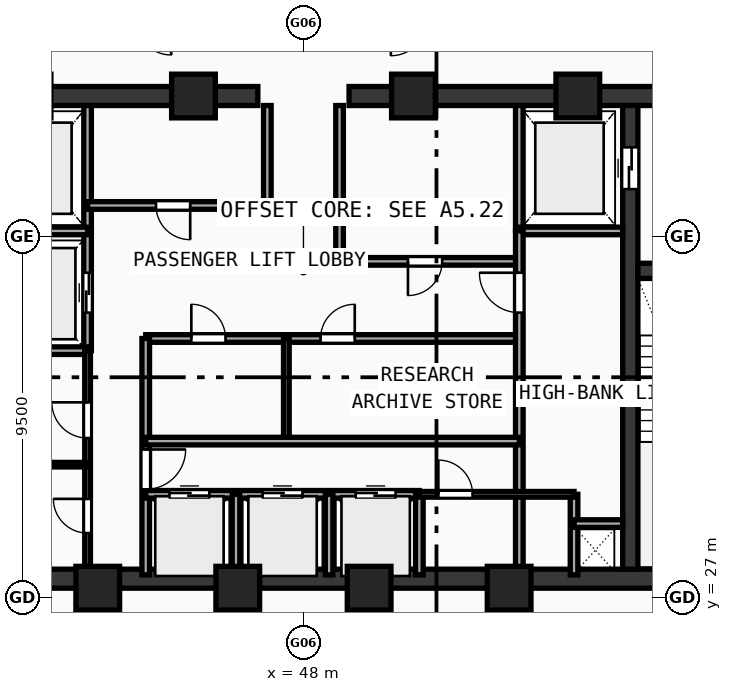
"""IFC4 building model, lengths in metres.
Left out: names, types, materials, properties, quantities, classifications, styles, units other than length and angle.
Written with IfcOpenShell. Run it as: python <this file> out.ifc"""

import sys

from ifc_helpers import new_model, si_unit, direction, frame, frame_2d, origin, origin_with_axes, origin_2d, place, context, subcontext, project, spatial, rectangle, hollow_rectangle, extrude, source, transform, mapped, element, fill, save


model = new_model("IFC4")
c1 = context("Model", 3, precision=1e-05, world=origin(), true_north=direction((0.0, 1.0)))
c2 = subcontext(c1, "Body", "Model", "MODEL_VIEW")
j1 = project(units=[si_unit("LENGTHUNIT", "METRE"), si_unit("PLANEANGLEUNIT", "RADIAN")], contexts=[c1])
p1 = place(None, origin())
s1 = spatial("IfcSite", under=j1, at=p1, CompositionType="ELEMENT")
p2 = place(p1, origin())
s2 = spatial("IfcBuilding", under=s1, at=p2, CompositionType="ELEMENT")
p3 = place(p2, frame((0.0, 0.0, 363.01)))
s3 = spatial("IfcBuildingStorey", under=s2, at=p3, CompositionType="ELEMENT", Elevation=363.01)
p4 = place(p3, frame((35.55, 27.5, 0.0), z_axis=(0.0, 0.0, 1.0), x_axis=(1.0, 0.0, 0.0)))
e1 = element("IfcWall", 1, at=p4, inside=s3, PredefinedType="SHEAR", context=c2, shape_type="SweptSolid", body=[
    extrude(rectangle(XDim=24.9, YDim=0.5, at=frame_2d((12.45, 0.0))), origin(), (0.0, 0.0, 1.0), 3.47),
])
p5 = place(p3, frame((35.55, 40.2, 0.0), z_axis=(0.0, 0.0, 1.0), x_axis=(1.0, 0.0, 0.0)))
e2 = element("IfcWall", 2, at=p5, inside=s3, PredefinedType="SHEAR", context=c2, shape_type="SweptSolid", body=[
    extrude(rectangle(XDim=11.25, YDim=0.5, at=frame_2d((5.625, 0.0))), origin(), (0.0, 0.0, 1.0), 3.47),
])
p6 = place(p5, frame((1.6, 0.0, 0.0)))
e3 = element("IfcOpeningElement", 3, at=p6, cuts=e2, PredefinedType="OPENING", context=c2, shape_type="SweptSolid", body=[
    extrude(rectangle(XDim=1.05, YDim=2.1, at=frame_2d((0.525, 1.05))), frame((0.0, 0.26, 0.0), z_axis=(0.0, -1.0, 0.0), x_axis=(1.0, 0.0, 0.0)), (0.0, 0.0, 1.0), 0.52),
])
p7 = place(p3, frame((49.2, 40.2, 0.0), z_axis=(0.0, 0.0, 1.0), x_axis=(1.0, 0.0, 0.0)))
e4 = element("IfcWall", 4, at=p7, inside=s3, PredefinedType="SHEAR", context=c2, shape_type="SweptSolid", body=[
    extrude(rectangle(XDim=11.25, YDim=0.5, at=frame_2d((5.625, 0.0))), origin(), (0.0, 0.0, 1.0), 3.47),
])
p8 = place(p7, frame((8.6, 0.0, 0.0)))
e5 = element("IfcOpeningElement", 5, at=p8, cuts=e4, PredefinedType="OPENING", context=c2, shape_type="SweptSolid", body=[
    extrude(rectangle(XDim=1.05, YDim=2.1, at=frame_2d((0.525, 1.05))), frame((0.0, 0.26, 0.0), z_axis=(0.0, -1.0, 0.0), x_axis=(1.0, 0.0, 0.0)), (0.0, 0.0, 1.0), 0.52),
])
p9 = place(p3, frame((56.6, 27.75, 0.0), z_axis=(0.0, 0.0, 1.0), x_axis=(0.0, 1.0, 0.0)))
e6 = element("IfcWall", 6, at=p9, inside=s3, PredefinedType="SHEAR", context=c2, shape_type="SweptSolid", body=[
    extrude(rectangle(XDim=12.2, YDim=0.4, at=frame_2d((6.1, 0.0))), origin(), (0.0, 0.0, 1.0), 3.47),
])
p10 = place(p9, frame((10.0, 0.0, 0.0)))
e7 = element("IfcOpeningElement", 7, at=p10, cuts=e6, PredefinedType="OPENING", context=c2, shape_type="SweptSolid", body=[
    extrude(rectangle(XDim=1.1, YDim=2.1, at=frame_2d((0.55, 1.05))), frame((0.0, 0.21, 0.0), z_axis=(0.0, -1.0, 0.0), x_axis=(1.0, 0.0, 0.0)), (0.0, 0.0, 1.0), 0.42),
])
p11 = place(p3, frame((56.8, 35.6, 0.0), z_axis=(0.0, 0.0, 1.0), x_axis=(1.0, 0.0, 0.0)))
e8 = element("IfcWall", 8, at=p11, inside=s3, PredefinedType="SHEAR", context=c2, shape_type="SweptSolid", body=[
    extrude(rectangle(XDim=3.15, YDim=0.4, at=frame_2d((1.575, 0.0))), origin(), (0.0, 0.0, 1.0), 3.47),
])
p12 = place(p11, frame((1.02, 0.0, 0.0)))
e9 = element("IfcOpeningElement", 9, at=p12, cuts=e8, PredefinedType="OPENING", context=c2, shape_type="SweptSolid", body=[
    extrude(rectangle(XDim=1.05, YDim=2.1, at=frame_2d((0.525, 1.05))), frame((0.0, 0.21, 0.0), z_axis=(0.0, -1.0, 0.0), x_axis=(1.0, 0.0, 0.0)), (0.0, 0.0, 1.0), 0.42),
])
m1 = source(origin(), c2, "Body", "SweptSolid", [
    extrude(hollow_rectangle(XDim=1.15, YDim=1.15, WallThickness=0.048, at=origin_2d()), origin(), (0.0, 0.0, 1.0), 3.73),
])
for number, where, z_axis, x_axis in (
    (10, (42.588, 27.25, -0.26), (0.0, 0.0, 1.0), (1.0, 0.0, 0.0)),
    (11, (46.272, 27.25, -0.26), (0.0, 0.0, 1.0), (1.0, 0.0, 0.0)),
    (12, (49.729, 27.25, -0.26), (0.0, 0.0, 1.0), (1.0, 0.0, 0.0)),
    (13, (53.412, 27.25, -0.26), (0.0, 0.0, 1.0), (1.0, 0.0, 0.0)),
    (14, (55.219, 40.2, -0.26), (0.0, 0.0, 1.0), (1.0, 0.0, 0.0)),
    (15, (50.894, 40.2, -0.26), (0.0, 0.0, 1.0), (1.0, 0.0, 0.0)),
    (16, (45.106, 40.2, -0.26), (0.0, 0.0, 1.0), (1.0, 0.0, 0.0)),
):
    element("IfcColumn", number, at=place(p3, frame(where, z_axis=z_axis, x_axis=x_axis)), inside=s3, PredefinedType="COLUMN", context=c2, shape_type="MappedRepresentation", body=[
        mapped(m1, transform((0.0, 0.0, 0.0), scale=1.0)),
    ])
p13 = place(p3, frame((42.32, 33.5, 0.0), z_axis=(0.0, 0.0, 1.0), x_axis=(0.0, 1.0, 0.0)))
e17 = element("IfcWall", 17, at=p13, inside=s3, PredefinedType="SOLIDWALL", context=c2, shape_type="SweptSolid", body=[
    extrude(rectangle(XDim=6.45, YDim=0.2, at=frame_2d((3.225, 0.0))), origin(), (0.0, 0.0, 1.0), 3.47),
])
p14 = place(p13, frame((1.0, 0.0, 0.0)))
e18 = element("IfcOpeningElement", 18, at=p14, cuts=e17, PredefinedType="OPENING", context=c2, shape_type="SweptSolid", body=[
    extrude(rectangle(XDim=1.05, YDim=2.1, at=frame_2d((0.525, 1.05))), frame((0.0, 0.11, 0.0), z_axis=(0.0, -1.0, 0.0), x_axis=(1.0, 0.0, 0.0)), (0.0, 0.0, 1.0), 0.22),
])
for number, where, z_axis, x_axis in (
    (19, (39.6, 36.65, 0.0), (0.0, 0.0, 1.0), (1.0, 0.0, 0.0)),
    (20, (39.6, 33.5, 0.0), (0.0, 0.0, 1.0), (1.0, 0.0, 0.0)),
):
    element("IfcWall", number, at=place(p3, frame(where, z_axis=z_axis, x_axis=x_axis)), inside=s3, PredefinedType="SOLIDWALL", context=c2, shape_type="SweptSolid", body=[
        extrude(rectangle(XDim=2.72, YDim=0.2, at=frame_2d((1.36, 0.0))), origin(), (0.0, 0.0, 1.0), 3.47),
    ])
p15 = place(p3, frame((53.68, 36.65, 0.0), z_axis=(0.0, 0.0, 1.0), x_axis=(0.0, 1.0, 0.0)))
e21 = element("IfcWall", 21, at=p15, inside=s3, PredefinedType="SOLIDWALL", context=c2, shape_type="SweptSolid", body=[
    extrude(rectangle(XDim=3.3, YDim=0.2, at=frame_2d((1.65, 0.0))), origin(), (0.0, 0.0, 1.0), 3.47),
])
p16 = place(p3, frame((53.68, 36.65, 0.0), z_axis=(0.0, 0.0, 1.0), x_axis=(1.0, 0.0, 0.0)))
e22 = element("IfcWall", 22, at=p16, inside=s3, PredefinedType="SOLIDWALL", context=c2, shape_type="SweptSolid", body=[
    extrude(rectangle(XDim=2.72, YDim=0.2, at=frame_2d((1.36, 0.0))), origin(), (0.0, 0.0, 1.0), 3.47),
])
p17 = place(p3, frame((42.32, 37.32, 0.0), z_axis=(0.0, 0.0, 1.0), x_axis=(1.0, 0.0, 0.0)))
e23 = element("IfcWall", 23, at=p17, inside=s3, PredefinedType="SOLIDWALL", context=c2, shape_type="SweptSolid", body=[
    extrude(rectangle(XDim=4.73, YDim=0.2, at=frame_2d((2.365, 0.0))), origin(), (0.0, 0.0, 1.0), 3.47),
])
p18 = place(p17, frame((1.8, 0.0, 0.0)))
e24 = element("IfcOpeningElement", 24, at=p18, cuts=e23, PredefinedType="OPENING", context=c2, shape_type="SweptSolid", body=[
    extrude(rectangle(XDim=0.9, YDim=2.1, at=frame_2d((0.45, 1.05))), frame((0.0, 0.11, 0.0), z_axis=(0.0, -1.0, 0.0), x_axis=(1.0, 0.0, 0.0)), (0.0, 0.0, 1.0), 0.22),
])
p19 = place(p3, frame((48.95, 35.85, 0.0), z_axis=(0.0, 0.0, 1.0), x_axis=(1.0, 0.0, 0.0)))
e25 = element("IfcWall", 25, at=p19, inside=s3, PredefinedType="SOLIDWALL", context=c2, shape_type="SweptSolid", body=[
    extrude(rectangle(XDim=4.73, YDim=0.2, at=frame_2d((2.365, 0.0))), origin(), (0.0, 0.0, 1.0), 3.47),
])
p20 = place(p19, frame((1.8, 0.0, 0.0)))
e26 = element("IfcOpeningElement", 26, at=p20, cuts=e25, PredefinedType="OPENING", context=c2, shape_type="SweptSolid", body=[
    extrude(rectangle(XDim=0.9, YDim=2.1, at=frame_2d((0.45, 1.05))), frame((0.0, 0.11, 0.0), z_axis=(0.0, -1.0, 0.0), x_axis=(1.0, 0.0, 0.0)), (0.0, 0.0, 1.0), 0.22),
])
p21 = place(p3, frame((47.05, 37.32, 0.0), z_axis=(0.0, 0.0, 1.0), x_axis=(0.0, 1.0, 0.0)))
e27 = element("IfcWall", 27, at=p21, inside=s3, PredefinedType="SOLIDWALL", context=c2, shape_type="SweptSolid", body=[
    extrude(rectangle(XDim=2.63, YDim=0.2, at=frame_2d((1.315, 0.0))), origin(), (0.0, 0.0, 1.0), 3.47),
])
p22 = place(p3, frame((48.95, 35.85, 0.0), z_axis=(0.0, 0.0, 1.0), x_axis=(0.0, 1.0, 0.0)))
e28 = element("IfcWall", 28, at=p22, inside=s3, PredefinedType="SOLIDWALL", context=c2, shape_type="SweptSolid", body=[
    extrude(rectangle(XDim=4.1, YDim=0.2, at=frame_2d((2.05, 0.0))), origin(), (0.0, 0.0, 1.0), 3.47),
])
p23 = place(p3, frame((43.85, 33.82, 0.0), z_axis=(0.0, 0.0, 1.0), x_axis=(1.0, 0.0, 0.0)))
e29 = element("IfcWall", 29, at=p23, inside=s3, PredefinedType="SOLIDWALL", context=c2, shape_type="SweptSolid", body=[
    extrude(rectangle(XDim=9.83, YDim=0.2, at=frame_2d((4.915, 0.0))), origin(), (0.0, 0.0, 1.0), 3.47),
])
p24 = place(p23, frame((1.2, 0.0, 0.0)))
e30 = element("IfcOpeningElement", 30, at=p24, cuts=e29, PredefinedType="OPENING", context=c2, shape_type="SweptSolid", body=[
    extrude(rectangle(XDim=0.9, YDim=2.1, at=frame_2d((0.45, 1.05))), frame((0.0, 0.11, 0.0), z_axis=(0.0, -1.0, 0.0), x_axis=(1.0, 0.0, 0.0)), (0.0, 0.0, 1.0), 0.22),
])
p25 = place(p23, frame((4.6, 0.0, 0.0)))
e31 = element("IfcOpeningElement", 31, at=p25, cuts=e29, PredefinedType="OPENING", context=c2, shape_type="SweptSolid", body=[
    extrude(rectangle(XDim=0.9, YDim=2.1, at=frame_2d((0.45, 1.05))), frame((0.0, 0.11, 0.0), z_axis=(0.0, -1.0, 0.0), x_axis=(1.0, 0.0, 0.0)), (0.0, 0.0, 1.0), 0.22),
])
p26 = place(p3, frame((43.85, 27.6, 0.0), z_axis=(0.0, 0.0, 1.0), x_axis=(0.0, 1.0, 0.0)))
e32 = element("IfcWall", 32, at=p26, inside=s3, PredefinedType="SOLIDWALL", context=c2, shape_type="SweptSolid", body=[
    extrude(rectangle(XDim=6.22, YDim=0.2, at=frame_2d((3.11, 0.0))), origin(), (0.0, 0.0, 1.0), 3.47),
])
p27 = place(p26, frame((2.25, 0.0, 0.0)))
e33 = element("IfcOpeningElement", 33, at=p27, cuts=e32, PredefinedType="OPENING", context=c2, shape_type="SweptSolid", body=[
    extrude(rectangle(XDim=1.05, YDim=2.1, at=frame_2d((0.525, 1.05))), frame((0.0, 0.11, 0.0), z_axis=(0.0, -1.0, 0.0), x_axis=(1.0, 0.0, 0.0)), (0.0, 0.0, 1.0), 0.22),
])
p28 = place(p3, frame((53.68, 27.6, 0.0), z_axis=(0.0, 0.0, 1.0), x_axis=(0.0, 1.0, 0.0)))
e34 = element("IfcWall", 34, at=p28, inside=s3, PredefinedType="SOLIDWALL", context=c2, shape_type="SweptSolid", body=[
    extrude(rectangle(XDim=9.05, YDim=0.2, at=frame_2d((4.525, 0.0))), origin(), (0.0, 0.0, 1.0), 3.47),
])
p29 = place(p28, frame((6.9, 0.0, 0.0)))
e35 = element("IfcOpeningElement", 35, at=p29, cuts=e34, PredefinedType="OPENING", context=c2, shape_type="SweptSolid", body=[
    extrude(rectangle(XDim=1.05, YDim=2.1, at=frame_2d((0.525, 1.05))), frame((0.0, 0.11, 0.0), z_axis=(0.0, -1.0, 0.0), x_axis=(1.0, 0.0, 0.0)), (0.0, 0.0, 1.0), 0.22),
])
p30 = place(p3, frame((47.55, 31.12, 0.0), z_axis=(0.0, 0.0, 1.0), x_axis=(0.0, 1.0, 0.0)))
e36 = element("IfcWall", 36, at=p30, inside=s3, PredefinedType="PARTITIONING", context=c2, shape_type="SweptSolid", body=[
    extrude(rectangle(XDim=2.7, YDim=0.15, at=frame_2d((1.35, 0.0))), origin(), (0.0, 0.0, 1.0), 3.47),
])
p31 = place(p3, frame((43.85, 29.72, 0.0), z_axis=(0.0, 0.0, 1.0), x_axis=(1.0, 0.0, 0.0)))
e37 = element("IfcWall", 37, at=p31, inside=s3, PredefinedType="SOLIDWALL", context=c2, shape_type="SweptSolid", body=[
    extrude(rectangle(XDim=7.2, YDim=0.2, at=frame_2d((3.6, 0.0))), origin(), (0.0, 0.0, 1.0), 3.47),
])
p32 = place(p31, frame((0.625, 0.0, 0.0)))
e38 = element("IfcOpeningElement", 38, at=p32, cuts=e37, PredefinedType="OPENING", context=c2, shape_type="SweptSolid", body=[
    extrude(rectangle(XDim=1.05, YDim=2.1, at=frame_2d((0.525, 1.05))), frame((0.0, 0.11, 0.0), z_axis=(0.0, -1.0, 0.0), x_axis=(1.0, 0.0, 0.0)), (0.0, 0.0, 1.0), 0.22),
])
p33 = place(p31, frame((3.075, 0.0, 0.0)))
e39 = element("IfcOpeningElement", 39, at=p33, cuts=e37, PredefinedType="OPENING", context=c2, shape_type="SweptSolid", body=[
    extrude(rectangle(XDim=1.05, YDim=2.1, at=frame_2d((0.525, 1.05))), frame((0.0, 0.11, 0.0), z_axis=(0.0, -1.0, 0.0), x_axis=(1.0, 0.0, 0.0)), (0.0, 0.0, 1.0), 0.22),
])
p34 = place(p31, frame((5.525, 0.0, 0.0)))
e40 = element("IfcOpeningElement", 40, at=p34, cuts=e37, PredefinedType="OPENING", context=c2, shape_type="SweptSolid", body=[
    extrude(rectangle(XDim=1.05, YDim=2.1, at=frame_2d((0.525, 1.05))), frame((0.0, 0.11, 0.0), z_axis=(0.0, -1.0, 0.0), x_axis=(1.0, 0.0, 0.0)), (0.0, 0.0, 1.0), 0.22),
])
p35 = place(p3, frame((51.05, 27.6, 0.0), z_axis=(0.0, 0.0, 1.0), x_axis=(0.0, 1.0, 0.0)))
e41 = element("IfcWall", 41, at=p35, inside=s3, PredefinedType="SOLIDWALL", context=c2, shape_type="SweptSolid", body=[
    extrude(rectangle(XDim=2.12, YDim=0.2, at=frame_2d((1.06, 0.0))), origin(), (0.0, 0.0, 1.0), 3.47),
])
p36 = place(p3, frame((43.85, 31.12, 0.0), z_axis=(0.0, 0.0, 1.0), x_axis=(1.0, 0.0, 0.0)))
e42 = element("IfcWall", 42, at=p36, inside=s3, PredefinedType="SOLIDWALL", context=c2, shape_type="SweptSolid", body=[
    extrude(rectangle(XDim=9.83, YDim=0.2, at=frame_2d((4.915, 0.0))), origin(), (0.0, 0.0, 1.0), 3.47),
])
for number, where, z_axis, x_axis in (
    (43, (46.225, 27.6, 0.0), (0.0, 0.0, 1.0), (0.0, 1.0, 0.0)),
    (44, (48.675, 27.6, 0.0), (0.0, 0.0, 1.0), (0.0, 1.0, 0.0)),
    (45, (55.12, 27.6, 0.0), (0.0, 0.0, 1.0), (0.0, 1.0, 0.0)),
):
    element("IfcWall", number, at=place(p3, frame(where, z_axis=z_axis, x_axis=x_axis)), inside=s3, PredefinedType="SOLIDWALL", context=c2, shape_type="SweptSolid", body=[
        extrude(rectangle(XDim=2.12, YDim=0.2, at=frame_2d((1.06, 0.0))), origin(), (0.0, 0.0, 1.0), 3.47),
    ])
p37 = place(p3, frame((55.12, 28.95, 0.0), z_axis=(0.0, 0.0, 1.0), x_axis=(1.0, 0.0, 0.0)))
e46 = element("IfcWall", 46, at=p37, inside=s3, PredefinedType="SOLIDWALL", context=c2, shape_type="SweptSolid", body=[
    extrude(rectangle(XDim=1.28, YDim=0.2, at=frame_2d((0.64, 0.0))), origin(), (0.0, 0.0, 1.0), 3.47),
])
p38 = place(p3, frame((42.32, 27.6, 0.0), z_axis=(0.0, 0.0, 1.0), x_axis=(0.0, 1.0, 0.0)))
e47 = element("IfcWall", 47, at=p38, inside=s3, PredefinedType="PARTITIONING", context=c2, shape_type="SweptSolid", body=[
    extrude(rectangle(XDim=5.9, YDim=0.15, at=frame_2d((2.95, 0.0))), origin(), (0.0, 0.0, 1.0), 3.47),
])
p39 = place(p38, frame((1.1, 0.0, 0.0)))
e48 = element("IfcOpeningElement", 48, at=p39, cuts=e47, PredefinedType="OPENING", context=c2, shape_type="SweptSolid", body=[
    extrude(rectangle(XDim=0.9, YDim=2.1, at=frame_2d((0.45, 1.05))), frame((0.0, 0.085, 0.0), z_axis=(0.0, -1.0, 0.0), x_axis=(1.0, 0.0, 0.0)), (0.0, 0.0, 1.0), 0.17),
])
p40 = place(p38, frame((3.6, 0.0, 0.0)))
e49 = element("IfcOpeningElement", 49, at=p40, cuts=e47, PredefinedType="OPENING", context=c2, shape_type="SweptSolid", body=[
    extrude(rectangle(XDim=0.94, YDim=2.1, at=frame_2d((0.47, 1.05))), frame((0.0, 0.085, 0.0), z_axis=(0.0, -1.0, 0.0), x_axis=(1.0, 0.0, 0.0)), (0.0, 0.0, 1.0), 0.17),
])
p41 = place(p3, frame((51.05, 29.72, 0.0), z_axis=(0.0, 0.0, 1.0), x_axis=(1.0, 0.0, 0.0)))
e50 = element("IfcWall", 50, at=p41, inside=s3, PredefinedType="PARTITIONING", context=c2, shape_type="SweptSolid", body=[
    extrude(rectangle(XDim=4.07, YDim=0.15, at=frame_2d((2.035, 0.0))), origin(), (0.0, 0.0, 1.0), 3.47),
])
p42 = place(p41, frame((0.5, 0.0, 0.0)))
e51 = element("IfcOpeningElement", 51, at=p42, cuts=e50, PredefinedType="OPENING", context=c2, shape_type="SweptSolid", body=[
    extrude(rectangle(XDim=0.9, YDim=2.1, at=frame_2d((0.45, 1.05))), frame((0.0, 0.085, 0.0), z_axis=(0.0, -1.0, 0.0), x_axis=(1.0, 0.0, 0.0)), (0.0, 0.0, 1.0), 0.17),
])
p43 = place(p3, frame((39.6, 30.5, 0.0), z_axis=(0.0, 0.0, 1.0), x_axis=(1.0, 0.0, 0.0)))
e52 = element("IfcWall", 52, at=p43, inside=s3, PredefinedType="PARTITIONING", context=c2, shape_type="SweptSolid", body=[
    extrude(rectangle(XDim=2.72, YDim=0.12, at=frame_2d((1.36, 0.0))), origin(), (0.0, 0.0, 1.0), 3.47),
])
m2 = source(origin(), c2, "Body", "SweptSolid", [
    extrude(rectangle(XDim=1.1, YDim=2.1, at=frame_2d((0.55, 1.05))), frame((0.0, 0.025, 0.0), z_axis=(0.0, -1.0, 0.0), x_axis=(1.0, 0.0, 0.0)), (0.0, 0.0, 1.0), 0.05),
])
p44 = place(p10, origin_with_axes())
e53 = element("IfcDoor", 53, at=p44, inside=s3, OperationType="DOUBLE_DOOR_SLIDING", PredefinedType="DOOR", context=c2, shape_type="MappedRepresentation", body=[
    mapped(m2, transform((0.0, 0.0, 0.0), scale=1.0)),
])
fill(e7, e53)
m3 = source(origin(), c2, "Body", "SweptSolid", [
    extrude(rectangle(XDim=1.05, YDim=2.1, at=frame_2d((0.525, 1.05))), frame((0.0, 0.025, 0.0), z_axis=(0.0, -1.0, 0.0), x_axis=(1.0, 0.0, 0.0)), (0.0, 0.0, 1.0), 0.05),
])
p45 = place(p14, origin_with_axes())
e54 = element("IfcDoor", 54, at=p45, inside=s3, OperationType="DOUBLE_DOOR_SLIDING", PredefinedType="DOOR", context=c2, shape_type="MappedRepresentation", body=[
    mapped(m3, transform((0.0, 0.0, 0.0), scale=1.0)),
])
fill(e18, e54)
m4 = source(origin(), c2, "Body", "SweptSolid", [
    extrude(rectangle(XDim=0.9, YDim=2.1, at=frame_2d((0.45, 1.05))), frame((0.0, 0.025, 0.0), z_axis=(0.0, -1.0, 0.0), x_axis=(1.0, 0.0, 0.0)), (0.0, 0.0, 1.0), 0.05),
])
p46 = place(p18, frame((0.9, 0.0, 0.0), z_axis=(0.0, 0.0, 1.0), x_axis=(-1.0, 0.0, 0.0)))
e55 = element("IfcDoor", 55, at=p46, inside=s3, OperationType="SINGLE_SWING_LEFT", PredefinedType="DOOR", context=c2, shape_type="MappedRepresentation", body=[
    mapped(m4, transform((0.0, 0.0, 0.0), scale=1.0)),
])
fill(e24, e55)
p47 = place(p20, frame((0.9, 0.0, 0.0), z_axis=(0.0, 0.0, 1.0), x_axis=(-1.0, 0.0, 0.0)))
e56 = element("IfcDoor", 56, at=p47, inside=s3, OperationType="SINGLE_SWING_RIGHT", PredefinedType="DOOR", context=c2, shape_type="MappedRepresentation", body=[
    mapped(m4, transform((0.0, 0.0, 0.0), scale=1.0)),
])
fill(e26, e56)
p48 = place(p24, origin_with_axes())
e57 = element("IfcDoor", 57, at=p48, inside=s3, OperationType="SINGLE_SWING_LEFT", PredefinedType="DOOR", context=c2, shape_type="MappedRepresentation", body=[
    mapped(m4, transform((0.0, 0.0, 0.0), scale=1.0)),
])
fill(e30, e57)
p49 = place(p25, origin_with_axes())
e58 = element("IfcDoor", 58, at=p49, inside=s3, OperationType="SINGLE_SWING_RIGHT", PredefinedType="DOOR", context=c2, shape_type="MappedRepresentation", body=[
    mapped(m4, transform((0.0, 0.0, 0.0), scale=1.0)),
])
fill(e31, e58)
p50 = place(p27, frame((1.05, 0.0, 0.0), z_axis=(0.0, 0.0, 1.0), x_axis=(-1.0, 0.0, 0.0)))
e59 = element("IfcDoor", 59, at=p50, inside=s3, OperationType="SINGLE_SWING_LEFT", PredefinedType="DOOR", context=c2, shape_type="MappedRepresentation", body=[
    mapped(m3, transform((0.0, 0.0, 0.0), scale=1.0)),
])
fill(e33, e59)
p51 = place(p29, origin_with_axes())
e60 = element("IfcDoor", 60, at=p51, inside=s3, OperationType="SINGLE_SWING_RIGHT", PredefinedType="DOOR", context=c2, shape_type="MappedRepresentation", body=[
    mapped(m3, transform((0.0, 0.0, 0.0), scale=1.0)),
])
fill(e35, e60)
p52 = place(p32, origin_with_axes())
e61 = element("IfcDoor", 61, at=p52, inside=s3, OperationType="DOUBLE_DOOR_SLIDING", PredefinedType="DOOR", context=c2, shape_type="MappedRepresentation", body=[
    mapped(m3, transform((0.0, 0.0, 0.0), scale=1.0)),
])
fill(e38, e61)
p53 = place(p33, origin_with_axes())
e62 = element("IfcDoor", 62, at=p53, inside=s3, OperationType="DOUBLE_DOOR_SLIDING", PredefinedType="DOOR", context=c2, shape_type="MappedRepresentation", body=[
    mapped(m3, transform((0.0, 0.0, 0.0), scale=1.0)),
])
fill(e39, e62)
p54 = place(p34, origin_with_axes())
e63 = element("IfcDoor", 63, at=p54, inside=s3, OperationType="DOUBLE_DOOR_SLIDING", PredefinedType="DOOR", context=c2, shape_type="MappedRepresentation", body=[
    mapped(m3, transform((0.0, 0.0, 0.0), scale=1.0)),
])
fill(e40, e63)
p55 = place(p39, origin_with_axes())
e64 = element("IfcDoor", 64, at=p55, inside=s3, OperationType="SINGLE_SWING_RIGHT", PredefinedType="DOOR", context=c2, shape_type="MappedRepresentation", body=[
    mapped(m4, transform((0.0, 0.0, 0.0), scale=1.0)),
])
fill(e48, e64)
m5 = source(origin(), c2, "Body", "SweptSolid", [
    extrude(rectangle(XDim=0.94, YDim=2.1, at=frame_2d((0.47, 1.05))), frame((0.0, 0.025, 0.0), z_axis=(0.0, -1.0, 0.0), x_axis=(1.0, 0.0, 0.0)), (0.0, 0.0, 1.0), 0.05),
])
p56 = place(p40, origin_with_axes())
e65 = element("IfcDoor", 65, at=p56, inside=s3, OperationType="SINGLE_SWING_RIGHT", PredefinedType="DOOR", context=c2, shape_type="MappedRepresentation", body=[
    mapped(m5, transform((0.0, 0.0, 0.0), scale=1.0)),
])
fill(e49, e65)
p57 = place(p42, origin_with_axes())
e66 = element("IfcDoor", 66, at=p57, inside=s3, OperationType="SINGLE_SWING_LEFT", PredefinedType="DOOR", context=c2, shape_type="MappedRepresentation", body=[
    mapped(m4, transform((0.0, 0.0, 0.0), scale=1.0)),
])
fill(e51, e66)
save(model, sys.argv[1])
